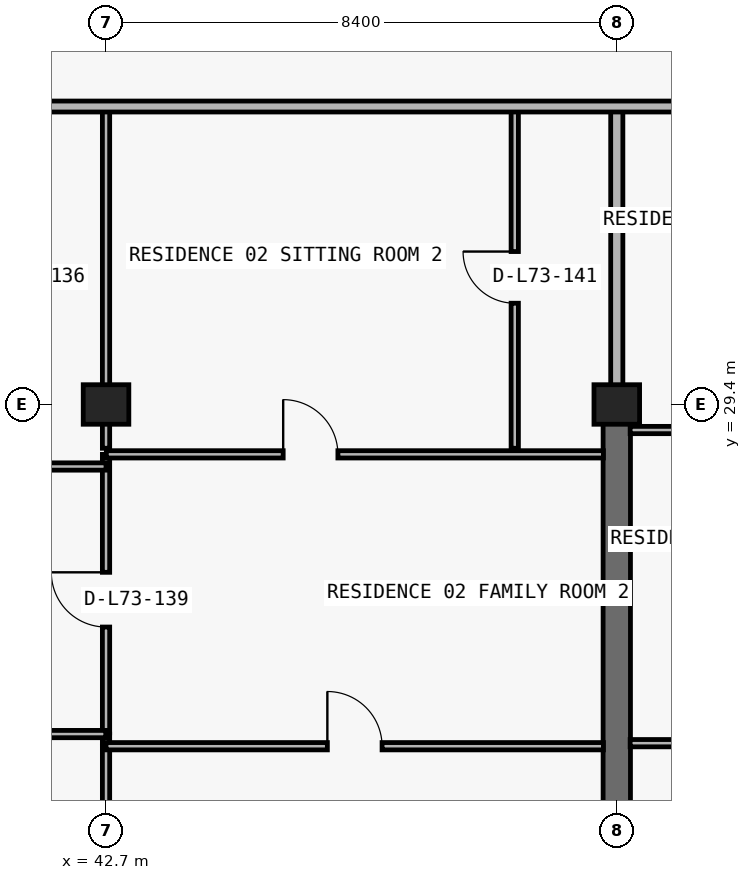
"""IFC4 building model, lengths in metres.
Left out: names, types, materials, properties, quantities, classifications, styles, units other than length and angle.
Written with IfcOpenShell. Run it as: python <this file> out.ifc"""

import sys

from ifc_helpers import new_model, si_unit, direction, frame, frame_2d, origin, origin_2d, place, context, subcontext, project, spatial, rectangle, extrude, element, fill, save


model = new_model("IFC4")
c1 = context("Model", 3, precision=1e-05, world=origin(), true_north=direction((0.0, 1.0)))
c2 = subcontext(c1, "Body", "Model", "MODEL_VIEW")
j1 = project(units=[si_unit("LENGTHUNIT", "METRE"), si_unit("PLANEANGLEUNIT", "RADIAN")], contexts=[c1])
p1 = place(None, origin())
s1 = spatial("IfcSite", under=j1, at=p1, CompositionType="ELEMENT")
p2 = place(p1, origin())
s2 = spatial("IfcBuilding", under=s1, at=p2, CompositionType="ELEMENT")
p3 = place(p2, frame((0.0, 0.0, 259.5)))
s3 = spatial("IfcBuildingStorey", under=s2, at=p3, CompositionType="ELEMENT", Elevation=259.5)
for number, where, z_axis, x_axis in (
    (1, (42.7, 29.4, 0.0), (0.0, 0.0, 1.0), (1.0, 0.0, 0.0)),
    (2, (51.1, 29.4, 0.0), (0.0, 0.0, 1.0), (1.0, 0.0, 0.0)),
):
    element("IfcColumn", number, at=place(p3, frame(where, z_axis=z_axis, x_axis=x_axis)), inside=s3, PredefinedType="COLUMN", context=c2, shape_type="SweptSolid", body=[
        extrude(rectangle(XDim=0.75, YDim=0.65, at=origin_2d()), origin(), (0.0, 0.0, 1.0), 3.05),
    ])
p4 = place(p3, frame((51.1, 20.8, 0.0), z_axis=(0.0, 0.0, 1.0), x_axis=(0.0, 1.0, 0.0)))
e3 = element("IfcWall", 3, at=p4, inside=s3, PredefinedType="SHEAR", context=c2, shape_type="SweptSolid", body=[
    extrude(rectangle(XDim=8.6, YDim=0.45, at=frame_2d((4.3, 0.0))), origin(), (0.0, 0.0, 1.0), 3.05),
])
p5 = place(p3, frame((42.7, 13.34, 0.0), z_axis=(0.0, 0.0, 1.0), x_axis=(0.0, 1.0, 0.0)))
e4 = element("IfcWall", 4, at=p5, inside=s3, PredefinedType="PARTITIONING", context=c2, shape_type="SweptSolid", body=[
    extrude(rectangle(XDim=10.44, YDim=0.12, at=frame_2d((5.22, 0.0))), origin(), (0.0, 0.0, 1.0), 2.263),
])
p6 = place(p3, frame((42.7, 23.83, 0.0), z_axis=(0.0, 0.0, 1.0), x_axis=(0.0, 1.0, 0.0)))
e5 = element("IfcWall", 5, at=p6, inside=s3, PredefinedType="PARTITIONING", context=c2, shape_type="SweptSolid", body=[
    extrude(rectangle(XDim=0.15, YDim=0.12, at=frame_2d((0.075, 0.0))), origin(), (0.0, 0.0, 1.0), 2.263),
])
p7 = place(p3, frame((42.7, 24.0, 0.0), z_axis=(0.0, 0.0, 1.0), x_axis=(0.0, 1.0, 0.0)))
e6 = element("IfcWall", 6, at=p7, inside=s3, PredefinedType="PARTITIONING", context=c2, shape_type="SweptSolid", body=[
    extrude(rectangle(XDim=4.58, YDim=0.12, at=frame_2d((2.29, 0.0))), origin(), (0.0, 0.0, 1.0), 2.263),
])
p8 = place(p7, frame((1.74, 0.0, 0.0)))
e7 = element("IfcOpeningElement", 7, at=p8, cuts=e6, PredefinedType="OPENING", context=c2, shape_type="SweptSolid", body=[
    extrude(rectangle(XDim=0.9, YDim=2.15, at=frame_2d((0.45, 1.075))), frame((0.0, 0.07, 0.0), z_axis=(0.0, -1.0, 0.0), x_axis=(1.0, 0.0, 0.0)), (0.0, 0.0, 1.0), 0.14),
])
p9 = place(p3, frame((42.7, 28.68, 0.0), z_axis=(0.0, 0.0, 1.0), x_axis=(0.0, 1.0, 0.0)))
e8 = element("IfcWall", 8, at=p9, inside=s3, PredefinedType="PARTITIONING", context=c2, shape_type="SweptSolid", body=[
    extrude(rectangle(XDim=5.62, YDim=0.12, at=frame_2d((2.81, 0.0))), origin(), (0.0, 0.0, 1.0), 2.263),
])
p10 = place(p3, frame((49.422, 28.68, 0.0), z_axis=(0.0, 0.0, 1.0), x_axis=(0.0, 1.0, 0.0)))
e9 = element("IfcWall", 9, at=p10, inside=s3, PredefinedType="PARTITIONING", context=c2, shape_type="SweptSolid", body=[
    extrude(rectangle(XDim=5.62, YDim=0.12, at=frame_2d((2.81, 0.0))), origin(), (0.0, 0.0, 1.0), 3.05),
])
p11 = place(p10, frame((2.385, 0.0, 0.0)))
e10 = element("IfcOpeningElement", 10, at=p11, cuts=e9, PredefinedType="OPENING", context=c2, shape_type="SweptSolid", body=[
    extrude(rectangle(XDim=0.85, YDim=2.1, at=frame_2d((0.425, 1.05))), frame((0.0, 0.07, 0.0), z_axis=(0.0, -1.0, 0.0), x_axis=(1.0, 0.0, 0.0)), (0.0, 0.0, 1.0), 0.14),
])
p12 = place(p3, frame((51.1, 29.405, 0.0), z_axis=(0.0, 0.0, 1.0), x_axis=(0.0, 1.0, 0.0)))
e11 = element("IfcWall", 11, at=p12, inside=s3, PredefinedType="PARTITIONING", context=c2, shape_type="SweptSolid", body=[
    extrude(rectangle(XDim=4.895, YDim=0.2, at=frame_2d((2.448, 0.0))), origin(), (0.0, 0.0, 1.0), 2.335),
])
p13 = place(p3, frame((42.7, 23.78, 0.0), z_axis=(0.0, 0.0, 1.0), x_axis=(1.0, 0.0, 0.0)))
e12 = element("IfcWall", 12, at=p13, inside=s3, PredefinedType="PARTITIONING", context=c2, shape_type="SweptSolid", body=[
    extrude(rectangle(XDim=8.18, YDim=0.12, at=frame_2d((4.09, 0.0))), origin(), (0.0, 0.0, 1.0), 3.05),
])
p14 = place(p13, frame((3.64, 0.0, 0.0)))
e13 = element("IfcOpeningElement", 13, at=p14, cuts=e12, PredefinedType="OPENING", context=c2, shape_type="SweptSolid", body=[
    extrude(rectangle(XDim=0.9, YDim=2.15, at=frame_2d((0.45, 1.075))), frame((0.0, 0.07, 0.0), z_axis=(0.0, -1.0, 0.0), x_axis=(1.0, 0.0, 0.0)), (0.0, 0.0, 1.0), 0.14),
])
p15 = place(p3, frame((51.32, 23.83, 0.0), z_axis=(0.0, 0.0, 1.0), x_axis=(1.0, 0.0, 0.0)))
e14 = element("IfcWall", 14, at=p15, inside=s3, PredefinedType="PARTITIONING", context=c2, shape_type="SweptSolid", body=[
    extrude(rectangle(XDim=8.18, YDim=0.12, at=frame_2d((4.09, 0.0))), origin(), (0.0, 0.0, 1.0), 3.05),
])
p16 = place(p15, frame((1.414, 0.0, 0.0)))
e15 = element("IfcOpeningElement", 15, at=p16, cuts=e14, PredefinedType="OPENING", context=c2, shape_type="SweptSolid", body=[
    extrude(rectangle(XDim=0.9, YDim=2.15, at=frame_2d((0.45, 1.075))), frame((0.0, 0.07, 0.0), z_axis=(0.0, -1.0, 0.0), x_axis=(1.0, 0.0, 0.0)), (0.0, 0.0, 1.0), 0.14),
])
p17 = place(p15, frame((5.798, 0.0, 0.0)))
e16 = element("IfcOpeningElement", 16, at=p17, cuts=e14, PredefinedType="OPENING", context=c2, shape_type="SweptSolid", body=[
    extrude(rectangle(XDim=0.9, YDim=2.15, at=frame_2d((0.45, 1.075))), frame((0.0, 0.07, 0.0), z_axis=(0.0, -1.0, 0.0), x_axis=(1.0, 0.0, 0.0)), (0.0, 0.0, 1.0), 0.14),
])
p18 = place(p3, frame((35.105, 23.98, 0.0), z_axis=(0.0, 0.0, 1.0), x_axis=(1.0, 0.0, 0.0)))
e17 = element("IfcWall", 17, at=p18, inside=s3, PredefinedType="PARTITIONING", context=c2, shape_type="SweptSolid", body=[
    extrude(rectangle(XDim=7.59, YDim=0.12, at=frame_2d((3.795, 0.0))), origin(), (0.0, 0.0, 1.0), 3.05),
])
p19 = place(p18, frame((3.345, 0.0, 0.0)))
e18 = element("IfcOpeningElement", 18, at=p19, cuts=e17, PredefinedType="OPENING", context=c2, shape_type="SweptSolid", body=[
    extrude(rectangle(XDim=0.9, YDim=2.15, at=frame_2d((0.45, 1.075))), frame((0.0, 0.07, 0.0), z_axis=(0.0, -1.0, 0.0), x_axis=(1.0, 0.0, 0.0)), (0.0, 0.0, 1.0), 0.14),
])
p20 = place(p3, frame((35.1, 28.38, 0.0), z_axis=(0.0, 0.0, 1.0), x_axis=(1.0, 0.0, 0.0)))
e19 = element("IfcWall", 19, at=p20, inside=s3, PredefinedType="PARTITIONING", context=c2, shape_type="SweptSolid", body=[
    extrude(rectangle(XDim=7.6, YDim=0.12, at=frame_2d((3.8, 0.0))), origin(), (0.0, 0.0, 1.0), 3.05),
])
p21 = place(p20, frame((2.497, 0.0, 0.0)))
e20 = element("IfcOpeningElement", 20, at=p21, cuts=e19, PredefinedType="OPENING", context=c2, shape_type="SweptSolid", body=[
    extrude(rectangle(XDim=0.9, YDim=2.15, at=frame_2d((0.45, 1.075))), frame((0.0, 0.07, 0.0), z_axis=(0.0, -1.0, 0.0), x_axis=(1.0, 0.0, 0.0)), (0.0, 0.0, 1.0), 0.14),
])
p22 = place(p3, frame((42.705, 28.58, 0.0), z_axis=(0.0, 0.0, 1.0), x_axis=(1.0, 0.0, 0.0)))
e21 = element("IfcWall", 21, at=p22, inside=s3, PredefinedType="PARTITIONING", context=c2, shape_type="SweptSolid", body=[
    extrude(rectangle(XDim=8.175, YDim=0.12, at=frame_2d((4.087, 0.0))), origin(), (0.0, 0.0, 1.0), 3.05),
])
p23 = place(p22, frame((2.908, 0.0, 0.0)))
e22 = element("IfcOpeningElement", 22, at=p23, cuts=e21, PredefinedType="OPENING", context=c2, shape_type="SweptSolid", body=[
    extrude(rectangle(XDim=0.9, YDim=2.15, at=frame_2d((0.45, 1.075))), frame((0.0, 0.07, 0.0), z_axis=(0.0, -1.0, 0.0), x_axis=(1.0, 0.0, 0.0)), (0.0, 0.0, 1.0), 0.14),
])
p24 = place(p3, frame((51.32, 28.98, 0.0), z_axis=(0.0, 0.0, 1.0), x_axis=(1.0, 0.0, 0.0)))
e23 = element("IfcWall", 23, at=p24, inside=s3, PredefinedType="PARTITIONING", context=c2, shape_type="SweptSolid", body=[
    extrude(rectangle(XDim=8.18, YDim=0.12, at=frame_2d((4.09, 0.0))), origin(), (0.0, 0.0, 1.0), 3.05),
])
p25 = place(p24, frame((1.708, 0.0, 0.0)))
e24 = element("IfcOpeningElement", 24, at=p25, cuts=e23, PredefinedType="OPENING", context=c2, shape_type="SweptSolid", body=[
    extrude(rectangle(XDim=0.9, YDim=2.15, at=frame_2d((0.45, 1.075))), frame((0.0, 0.07, 0.0), z_axis=(0.0, -1.0, 0.0), x_axis=(1.0, 0.0, 0.0)), (0.0, 0.0, 1.0), 0.14),
])
p26 = place(p3, frame((12.105, 34.3, 0.0), z_axis=(0.0, 0.0, 1.0), x_axis=(1.0, 0.0, 0.0)))
e25 = element("IfcWall", 25, at=p26, inside=s3, PredefinedType="PARTITIONING", context=c2, shape_type="SweptSolid", body=[
    extrude(rectangle(XDim=53.595, YDim=0.18, at=frame_2d((26.797, 0.0))), origin(), (0.0, 0.0, 1.0), 3.05),
])
p27 = place(p26, frame((1.661, 0.0, 0.0)))
e26 = element("IfcOpeningElement", 26, at=p27, cuts=e25, PredefinedType="OPENING", context=c2, shape_type="SweptSolid", body=[
    extrude(rectangle(XDim=1.0, YDim=2.2, at=frame_2d((0.5, 1.1))), frame((0.0, 0.1, 0.0), z_axis=(0.0, -1.0, 0.0), x_axis=(1.0, 0.0, 0.0)), (0.0, 0.0, 1.0), 0.2),
])
p28 = place(p26, frame((17.438, 0.0, 0.0)))
e27 = element("IfcOpeningElement", 27, at=p28, cuts=e25, PredefinedType="OPENING", context=c2, shape_type="SweptSolid", body=[
    extrude(rectangle(XDim=1.0, YDim=2.2, at=frame_2d((0.5, 1.1))), frame((0.0, 0.1, 0.0), z_axis=(0.0, -1.0, 0.0), x_axis=(1.0, 0.0, 0.0)), (0.0, 0.0, 1.0), 0.2),
])
p29 = place(p26, frame((41.727, 0.0, 0.0)))
e28 = element("IfcOpeningElement", 28, at=p29, cuts=e25, PredefinedType="OPENING", context=c2, shape_type="SweptSolid", body=[
    extrude(rectangle(XDim=1.0, YDim=2.2, at=frame_2d((0.5, 1.1))), frame((0.0, 0.1, 0.0), z_axis=(0.0, -1.0, 0.0), x_axis=(1.0, 0.0, 0.0)), (0.0, 0.0, 1.0), 0.2),
])
p30 = place(p26, frame((49.141, 0.0, 0.0)))
e29 = element("IfcOpeningElement", 29, at=p30, cuts=e25, PredefinedType="OPENING", context=c2, shape_type="SweptSolid", body=[
    extrude(rectangle(XDim=1.0, YDim=2.2, at=frame_2d((0.5, 1.1))), frame((0.0, 0.1, 0.0), z_axis=(0.0, -1.0, 0.0), x_axis=(1.0, 0.0, 0.0)), (0.0, 0.0, 1.0), 0.2),
])
p31 = place(p8, origin())
e30 = element("IfcDoor", 30, at=p31, inside=s3, OperationType="SINGLE_SWING_RIGHT", PredefinedType="DOOR", context=c2, shape_type="SweptSolid", body=[
    extrude(rectangle(XDim=0.9, YDim=2.15, at=frame_2d((0.45, 1.075))), frame((0.0, 0.025, 0.0), z_axis=(0.0, -1.0, 0.0), x_axis=(1.0, 0.0, 0.0)), (0.0, 0.0, 1.0), 0.05),
])
fill(e7, e30)
p32 = place(p23, origin())
e31 = element("IfcDoor", 31, at=p32, inside=s3, OperationType="SINGLE_SWING_LEFT", PredefinedType="DOOR", context=c2, shape_type="SweptSolid", body=[
    extrude(rectangle(XDim=0.9, YDim=2.15, at=frame_2d((0.45, 1.075))), frame((0.0, 0.025, 0.0), z_axis=(0.0, -1.0, 0.0), x_axis=(1.0, 0.0, 0.0)), (0.0, 0.0, 1.0), 0.05),
])
fill(e22, e31)
p33 = place(p11, origin())
e32 = element("IfcDoor", 32, at=p33, inside=s3, OperationType="SINGLE_SWING_RIGHT", PredefinedType="DOOR", context=c2, shape_type="SweptSolid", body=[
    extrude(rectangle(XDim=0.85, YDim=2.1, at=frame_2d((0.425, 1.05))), frame((0.0, 0.025, 0.0), z_axis=(0.0, -1.0, 0.0), x_axis=(1.0, 0.0, 0.0)), (0.0, 0.0, 1.0), 0.05),
])
fill(e10, e32)
p34 = place(p14, origin())
e33 = element("IfcDoor", 33, at=p34, inside=s3, OperationType="SINGLE_SWING_LEFT", PredefinedType="DOOR", context=c2, shape_type="SweptSolid", body=[
    extrude(rectangle(XDim=0.9, YDim=2.15, at=frame_2d((0.45, 1.075))), frame((0.0, 0.025, 0.0), z_axis=(0.0, -1.0, 0.0), x_axis=(1.0, 0.0, 0.0)), (0.0, 0.0, 1.0), 0.05),
])
fill(e13, e33)
save(model, sys.argv[1])
